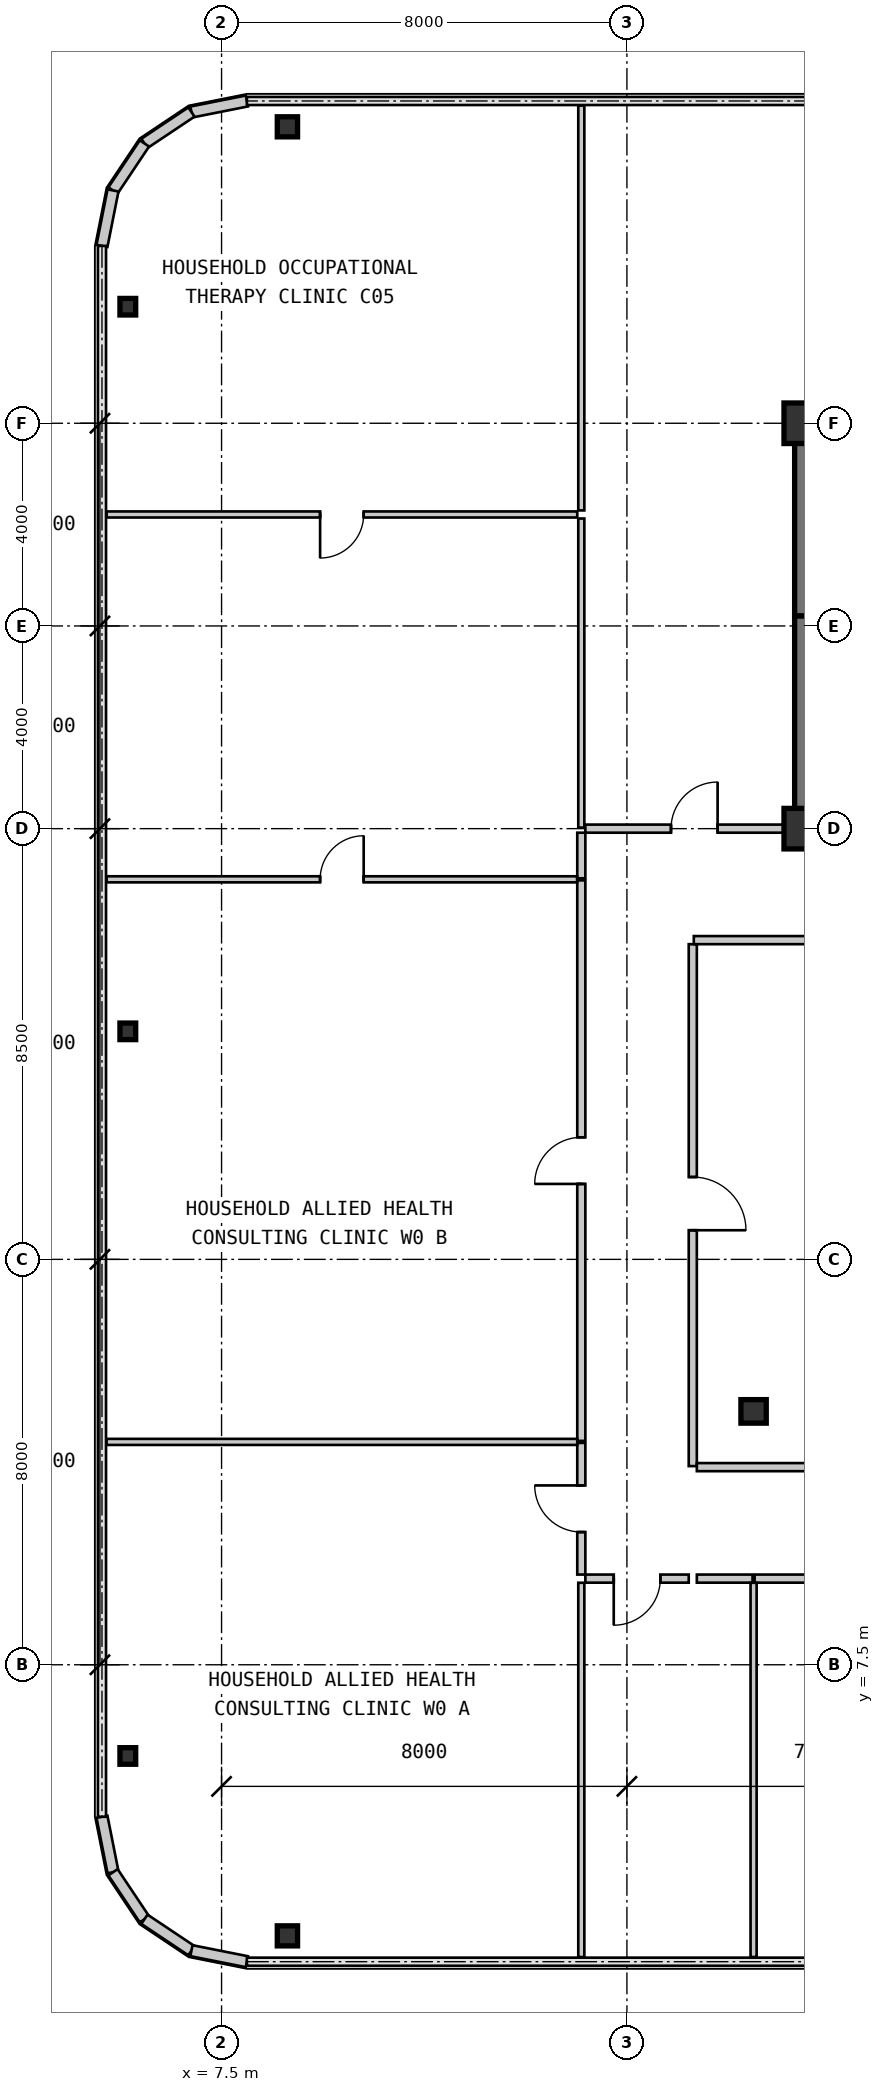
"""IFC4 building model, lengths in metres.
Left out: names, types, materials, properties, quantities, classifications, styles, units other than length and angle.
Written with IfcOpenShell. Run it as: python <this file> out.ifc"""

import sys

from ifc_helpers import new_model, si_unit, direction, frame, frame_2d, origin, origin_2d, place, context, subcontext, project, spatial, rectangle, i_section, extrude, source, transform, mapped, element, fill, save


model = new_model("IFC4")
c1 = context("Model", 3, precision=1e-05, world=origin(), true_north=direction((0.0, 1.0)))
c2 = subcontext(c1, "Body", "Model", "MODEL_VIEW")
j1 = project(units=[si_unit("LENGTHUNIT", "METRE"), si_unit("PLANEANGLEUNIT", "RADIAN")], contexts=[c1])
p1 = place(None, origin())
s1 = spatial("IfcSite", under=j1, at=p1, CompositionType="ELEMENT")
p2 = place(p1, origin())
s2 = spatial("IfcBuilding", under=s1, at=p2, CompositionType="ELEMENT")
p3 = place(p2, frame((0.0, 0.0, 57.75)))
s3 = spatial("IfcBuildingStorey", under=s2, at=p3, CompositionType="ELEMENT", Elevation=57.75)
m1 = source(origin(), c2, "Body", "SweptSolid", [
    extrude(rectangle(XDim=0.8, YDim=0.8, at=origin_2d()), origin(), (0.0, 0.0, 1.0), 3.15),
])
for number, where, z_axis, x_axis in (
    (1, (19.0, 24.0, 0.0), (0.0, 0.0, 1.0), (1.0, 0.0, 0.0)),
    (2, (19.0, 32.0, 0.0), (0.0, 0.0, 1.0), (1.0, 0.0, 0.0)),
):
    element("IfcColumn", number, at=place(p3, frame(where, z_axis=z_axis, x_axis=x_axis)), inside=s3, PredefinedType="COLUMN", context=c2, shape_type="MappedRepresentation", body=[
        mapped(m1, transform((0.0, 0.0, 0.0), scale=1.0)),
    ])
m2 = source(origin(), c2, "Body", "SweptSolid", [
    extrude(i_section(OverallWidth=0.5, OverallDepth=0.464, WebThickness=0.022, FlangeThickness=0.034, at=origin_2d()), origin(), (0.0, 0.0, 1.0), 3.15),
])
p4 = place(p3, frame((18.0, 12.5, 0.0), z_axis=(0.0, 0.0, 1.0), x_axis=(1.0, 0.0, 0.0)))
e3 = element("IfcColumn", 3, at=p4, inside=s3, PredefinedType="COLUMN", context=c2, shape_type="MappedRepresentation", body=[
    mapped(m2, transform((0.0, 0.0, 0.0), scale=1.0)),
])
m3 = source(origin(), c2, "Body", "SweptSolid", [
    extrude(i_section(OverallWidth=0.4, OverallDepth=0.396, WebThickness=0.022, FlangeThickness=0.034, at=origin_2d()), origin(), (0.0, 0.0, 1.0), 3.15),
])
for number, where, z_axis, x_axis in (
    (4, (8.8, 2.15, 0.0), (0.0, 0.0, 1.0), (1.0, 0.0, 0.0)),
    (5, (8.8, 37.85, 0.0), (0.0, 0.0, 1.0), (1.0, 0.0, 0.0)),
):
    element("IfcColumn", number, at=place(p3, frame(where, z_axis=z_axis, x_axis=x_axis)), inside=s3, PredefinedType="COLUMN", context=c2, shape_type="MappedRepresentation", body=[
        mapped(m3, transform((0.0, 0.0, 0.0), scale=1.0)),
    ])
m4 = source(origin(), c2, "Body", "SweptSolid", [
    extrude(i_section(OverallWidth=0.311, OverallDepth=0.327, WebThickness=0.016, FlangeThickness=0.025, at=origin_2d()), origin(), (0.0, 0.0, 1.0), 3.15),
])
for number, where, z_axis, x_axis in (
    (6, (5.65, 5.7, 0.0), (0.0, 0.0, 1.0), (1.0, 0.0, 0.0)),
    (7, (5.65, 20.0, 0.0), (0.0, 0.0, 1.0), (1.0, 0.0, 0.0)),
    (8, (5.65, 34.3, 0.0), (0.0, 0.0, 1.0), (1.0, 0.0, 0.0)),
):
    element("IfcColumn", number, at=place(p3, frame(where, z_axis=z_axis, x_axis=x_axis)), inside=s3, PredefinedType="COLUMN", context=c2, shape_type="MappedRepresentation", body=[
        mapped(m4, transform((0.0, 0.0, 0.0), scale=1.0)),
    ])
m5 = source(origin(), c2, "Body", "SweptSolid", [
    extrude(rectangle(XDim=1.116, YDim=0.22, at=frame_2d((0.558, 0.0))), origin(), (0.0, 0.0, 1.0), 2.87),
])
for number, where, z_axis, x_axis in (
    (9, (8.0, 38.36, 0.0), (0.0, 0.0, 1.0), (-0.981, -0.195, 0.0)),
    (10, (6.906, 38.142, 0.0), (0.0, 0.0, 1.0), (-0.831, -0.556, 0.0)),
    (11, (5.978, 37.522, 0.0), (0.0, 0.0, 1.0), (-0.556, -0.831, 0.0)),
    (12, (5.358, 36.594, 0.0), (0.0, 0.0, 1.0), (-0.195, -0.981, 0.0)),
    (13, (5.14, 4.5, 0.0), (0.0, 0.0, 1.0), (0.195, -0.981, 0.0)),
    (14, (5.358, 3.406, 0.0), (0.0, 0.0, 1.0), (0.556, -0.831, 0.0)),
    (15, (5.978, 2.478, 0.0), (0.0, 0.0, 1.0), (0.831, -0.556, 0.0)),
    (16, (6.906, 1.858, 0.0), (0.0, 0.0, 1.0), (0.981, -0.195, 0.0)),
):
    element("IfcWall", number, at=place(p3, frame(where, z_axis=z_axis, x_axis=x_axis)), inside=s3, PredefinedType="SOLIDWALL", context=c2, shape_type="MappedRepresentation", body=[
        mapped(m5, transform((0.0, 0.0, 0.0), scale=1.0)),
    ])
m6 = source(origin(), c2, "Body", "SweptSolid", [
    extrude(rectangle(XDim=9.19, YDim=0.38, at=frame_2d((4.595, 0.0))), origin(), (0.0, 0.0, 1.0), 2.87),
])
p5 = place(p3, frame((18.81, 32.0, 0.0), z_axis=(0.0, 0.0, 1.0), x_axis=(1.0, 0.0, 0.0)))
e17 = element("IfcWall", 17, at=p5, inside=s3, PredefinedType="SHEAR", context=c2, shape_type="MappedRepresentation", body=[
    mapped(m6, transform((0.0, 0.0, 0.0), scale=1.0)),
])
m7 = source(origin(), c2, "Body", "SweptSolid", [
    extrude(rectangle(XDim=4.01, YDim=0.38, at=frame_2d((2.005, 0.0))), origin(), (0.0, 0.0, 1.0), 2.87),
])
p6 = place(p3, frame((19.0, 24.19, 0.0), z_axis=(0.0, 0.0, 1.0), x_axis=(0.0, 1.0, 0.0)))
e18 = element("IfcWall", 18, at=p6, inside=s3, PredefinedType="SHEAR", context=c2, shape_type="MappedRepresentation", body=[
    mapped(m7, transform((0.0, 0.0, 0.0), scale=1.0)),
])
m8 = source(origin(), c2, "Body", "SweptSolid", [
    extrude(rectangle(XDim=3.61, YDim=0.38, at=frame_2d((1.805, 0.0))), origin(), (0.0, 0.0, 1.0), 2.87),
])
p7 = place(p3, frame((19.0, 28.2, 0.0), z_axis=(0.0, 0.0, 1.0), x_axis=(0.0, 1.0, 0.0)))
e19 = element("IfcWall", 19, at=p7, inside=s3, PredefinedType="SHEAR", context=c2, shape_type="MappedRepresentation", body=[
    mapped(m8, transform((0.0, 0.0, 0.0), scale=1.0)),
])
m9 = source(origin(), c2, "Body", "SweptSolid", [
    extrude(rectangle(XDim=4.98, YDim=0.38, at=frame_2d((2.49, 0.0))), origin(), (0.0, 0.0, 1.0), 2.87),
])
p8 = place(p3, frame((18.81, 24.0, 0.0), z_axis=(0.0, 0.0, 1.0), x_axis=(1.0, 0.0, 0.0)))
e20 = element("IfcWall", 20, at=p8, inside=s3, PredefinedType="SHEAR", context=c2, shape_type="MappedRepresentation", body=[
    mapped(m9, transform((0.0, 0.0, 0.0), scale=1.0)),
])
m10 = source(origin(), c2, "Body", "SweptSolid", [
    extrude(rectangle(XDim=10.3, YDim=0.16, at=frame_2d((5.15, 0.0))), origin(), (0.0, 0.0, 1.0), 2.87),
])
p9 = place(p3, frame((16.8, 21.72, 0.0), z_axis=(0.0, 0.0, 1.0), x_axis=(0.0, -1.0, 0.0)))
e21 = element("IfcWall", 21, at=p9, inside=s3, PredefinedType="PARTITIONING", context=c2, shape_type="MappedRepresentation", body=[
    mapped(m10, transform((0.0, 0.0, 0.0), scale=1.0)),
])
m11 = source(origin(), c2, "Body", "SweptSolid", [
    extrude(rectangle(XDim=1.05, YDim=2.1, at=frame_2d((0.525, 1.05))), frame((0.0, 0.09, 0.0), z_axis=(0.0, -1.0, 0.0), x_axis=(1.0, 0.0, 0.0)), (0.0, 0.0, 1.0), 0.18),
])
p10 = place(p9, frame((4.595, 0.0, 0.0)))
e22 = element("IfcOpeningElement", 22, at=p10, cuts=e21, PredefinedType="OPENING", context=c2, shape_type="MappedRepresentation", body=[
    mapped(m11, transform((0.0, 0.0, 0.0), scale=1.0)),
])
m12 = source(origin(), c2, "Body", "SweptSolid", [
    extrude(rectangle(XDim=9.159, YDim=0.16, at=frame_2d((4.58, 0.0))), origin(), (0.0, 0.0, 1.0), 2.87),
])
p11 = place(p3, frame((25.98, 21.8, 0.0), z_axis=(0.0, 0.0, 1.0), x_axis=(-1.0, 0.0, 0.0)))
e23 = element("IfcWall", 23, at=p11, inside=s3, PredefinedType="PARTITIONING", context=c2, shape_type="MappedRepresentation", body=[
    mapped(m12, transform((0.0, 0.0, 0.0), scale=1.0)),
])
m13 = source(origin(), c2, "Body", "SweptSolid", [
    extrude(rectangle(XDim=2.04, YDim=0.16, at=frame_2d((1.02, 0.0))), origin(), (0.0, 0.0, 1.0), 2.87),
])
p12 = place(p3, frame((16.72, 9.2, 0.0), z_axis=(0.0, 0.0, 1.0), x_axis=(-1.0, 0.0, 0.0)))
e24 = element("IfcWall", 24, at=p12, inside=s3, PredefinedType="PARTITIONING", context=c2, shape_type="MappedRepresentation", body=[
    mapped(m13, transform((0.0, 0.0, 0.0), scale=1.0)),
])
m14 = source(origin(), c2, "Body", "SweptSolid", [
    extrude(rectangle(XDim=0.92, YDim=2.1, at=frame_2d((0.46, 1.05))), frame((0.0, 0.09, 0.0), z_axis=(0.0, -1.0, 0.0), x_axis=(1.0, 0.0, 0.0)), (0.0, 0.0, 1.0), 0.18),
])
p13 = place(p12, frame((0.56, 0.0, 0.0)))
e25 = element("IfcOpeningElement", 25, at=p13, cuts=e24, PredefinedType="OPENING", context=c2, shape_type="MappedRepresentation", body=[
    mapped(m14, transform((0.0, 0.0, 0.0), scale=1.0)),
])
m15 = source(origin(), c2, "Body", "SweptSolid", [
    extrude(rectangle(XDim=2.598, YDim=0.16, at=frame_2d((1.299, 0.0))), origin(), (0.0, 0.0, 1.0), 2.87),
])
p14 = place(p3, frame((14.6, 9.28, 0.0), z_axis=(0.0, 0.0, 1.0), x_axis=(0.0, 1.0, 0.0)))
e26 = element("IfcWall", 26, at=p14, inside=s3, PredefinedType="PARTITIONING", context=c2, shape_type="MappedRepresentation", body=[
    mapped(m15, transform((0.0, 0.0, 0.0), scale=1.0)),
])
p15 = place(p14, frame((0.839, 0.0, 0.0)))
e27 = element("IfcOpeningElement", 27, at=p15, cuts=e26, PredefinedType="OPENING", context=c2, shape_type="MappedRepresentation", body=[
    mapped(m14, transform((0.0, 0.0, 0.0), scale=1.0)),
])
m16 = source(origin(), c2, "Body", "SweptSolid", [
    extrude(rectangle(XDim=11.061, YDim=0.16, at=frame_2d((5.531, 0.0))), origin(), (0.0, 0.0, 1.0), 2.87),
])
p16 = place(p3, frame((14.6, 11.918, 0.0), z_axis=(0.0, 0.0, 1.0), x_axis=(0.0, 1.0, 0.0)))
e28 = element("IfcWall", 28, at=p16, inside=s3, PredefinedType="PARTITIONING", context=c2, shape_type="MappedRepresentation", body=[
    mapped(m16, transform((0.0, 0.0, 0.0), scale=1.0)),
])
p17 = place(p16, frame((5.071, 0.0, 0.0)))
e29 = element("IfcOpeningElement", 29, at=p17, cuts=e28, PredefinedType="OPENING", context=c2, shape_type="MappedRepresentation", body=[
    mapped(m14, transform((0.0, 0.0, 0.0), scale=1.0)),
])
m17 = source(origin(), c2, "Body", "SweptSolid", [
    extrude(rectangle(XDim=0.9, YDim=0.16, at=frame_2d((0.45, 0.0))), origin(), (0.0, 0.0, 1.0), 2.87),
])
p18 = place(p3, frame((14.6, 23.02, 0.0), z_axis=(0.0, 0.0, 1.0), x_axis=(0.0, 1.0, 0.0)))
e30 = element("IfcWall", 30, at=p18, inside=s3, PredefinedType="PARTITIONING", context=c2, shape_type="MappedRepresentation", body=[
    mapped(m17, transform((0.0, 0.0, 0.0), scale=1.0)),
])
m18 = source(origin(), c2, "Body", "SweptSolid", [
    extrude(rectangle(XDim=4.13, YDim=0.16, at=frame_2d((2.065, 0.0))), origin(), (0.0, 0.0, 1.0), 2.87),
])
p19 = place(p3, frame((14.68, 24.0, 0.0), z_axis=(0.0, 0.0, 1.0), x_axis=(1.0, 0.0, 0.0)))
e31 = element("IfcWall", 31, at=p19, inside=s3, PredefinedType="PARTITIONING", context=c2, shape_type="MappedRepresentation", body=[
    mapped(m18, transform((0.0, 0.0, 0.0), scale=1.0)),
])
p20 = place(p19, frame((1.69, 0.0, 0.0)))
e32 = element("IfcOpeningElement", 32, at=p20, cuts=e31, PredefinedType="OPENING", context=c2, shape_type="MappedRepresentation", body=[
    mapped(m14, transform((0.0, 0.0, 0.0), scale=1.0)),
])
m19 = source(origin(), c2, "Body", "SweptSolid", [
    extrude(rectangle(XDim=9.1, YDim=0.16, at=frame_2d((4.55, 0.0))), origin(), (0.0, 0.0, 1.0), 2.87),
])
p21 = place(p3, frame((16.88, 11.4, 0.0), z_axis=(0.0, 0.0, 1.0), x_axis=(1.0, 0.0, 0.0)))
e33 = element("IfcWall", 33, at=p21, inside=s3, PredefinedType="PARTITIONING", context=c2, shape_type="MappedRepresentation", body=[
    mapped(m19, transform((0.0, 0.0, 0.0), scale=1.0)),
])
m20 = source(origin(), c2, "Body", "SweptSolid", [
    extrude(rectangle(XDim=1.1, YDim=0.16, at=frame_2d((0.55, 0.0))), origin(), (0.0, 0.0, 1.0), 2.87),
])
p22 = place(p3, frame((17.98, 9.2, 0.0), z_axis=(0.0, 0.0, 1.0), x_axis=(-1.0, 0.0, 0.0)))
e34 = element("IfcWall", 34, at=p22, inside=s3, PredefinedType="PARTITIONING", context=c2, shape_type="MappedRepresentation", body=[
    mapped(m20, transform((0.0, 0.0, 0.0), scale=1.0)),
])
m21 = source(origin(), c2, "Body", "SweptSolid", [
    extrude(rectangle(XDim=9.959, YDim=0.16, at=frame_2d((4.98, 0.0))), origin(), (0.0, 0.0, 1.0), 2.87),
])
p23 = place(p3, frame((27.98, 9.2, 0.0), z_axis=(0.0, 0.0, 1.0), x_axis=(-1.0, 0.0, 0.0)))
e35 = element("IfcWall", 35, at=p23, inside=s3, PredefinedType="PARTITIONING", context=c2, shape_type="MappedRepresentation", body=[
    mapped(m21, transform((0.0, 0.0, 0.0), scale=1.0)),
])
p24 = place(p23, frame((4.52, 0.0, 0.0)))
e36 = element("IfcOpeningElement", 36, at=p24, cuts=e35, PredefinedType="OPENING", context=c2, shape_type="MappedRepresentation", body=[
    mapped(m14, transform((0.0, 0.0, 0.0), scale=1.0)),
])
m22 = source(origin(), c2, "Body", "SweptSolid", [
    extrude(rectangle(XDim=7.386, YDim=0.12, at=frame_2d((3.693, 0.0))), origin(), (0.0, 0.0, 1.0), 2.87),
])
for number, where, z_axis, x_axis in (
    (37, (18.0, 9.118, 0.0), (0.0, 0.0, 1.0), (0.0, -1.0, 0.0)),
    (38, (14.6, 1.732, 0.0), (0.0, 0.0, 1.0), (0.0, 1.0, 0.0)),
):
    element("IfcWall", number, at=place(p3, frame(where, z_axis=z_axis, x_axis=x_axis)), inside=s3, PredefinedType="PARTITIONING", context=c2, shape_type="MappedRepresentation", body=[
        mapped(m22, transform((0.0, 0.0, 0.0), scale=1.0)),
    ])
m23 = source(origin(), c2, "Body", "SweptSolid", [
    extrude(rectangle(XDim=9.29, YDim=0.12, at=frame_2d((4.645, 0.0))), origin(), (0.0, 0.0, 1.0), 2.87),
])
p25 = place(p3, frame((5.23, 11.898, 0.0), z_axis=(0.0, 0.0, 1.0), x_axis=(1.0, 0.0, 0.0)))
e39 = element("IfcWall", 39, at=p25, inside=s3, PredefinedType="PARTITIONING", context=c2, shape_type="MappedRepresentation", body=[
    mapped(m23, transform((0.0, 0.0, 0.0), scale=1.0)),
])
m24 = source(origin(), c2, "Body", "SweptSolid", [
    extrude(rectangle(XDim=9.284, YDim=0.12, at=frame_2d((4.642, 0.0))), origin(), (0.0, 0.0, 1.0), 2.87),
])
p26 = place(p3, frame((5.233, 23.0, 0.0), z_axis=(0.0, 0.0, 1.0), x_axis=(1.0, 0.0, 0.0)))
e40 = element("IfcWall", 40, at=p26, inside=s3, PredefinedType="PARTITIONING", context=c2, shape_type="MappedRepresentation", body=[
    mapped(m24, transform((0.0, 0.0, 0.0), scale=1.0)),
])
m25 = source(origin(), c2, "Body", "SweptSolid", [
    extrude(rectangle(XDim=0.86, YDim=2.1, at=frame_2d((0.43, 1.05))), frame((0.0, 0.07, 0.0), z_axis=(0.0, -1.0, 0.0), x_axis=(1.0, 0.0, 0.0)), (0.0, 0.0, 1.0), 0.14),
])
p27 = place(p26, frame((4.212, 0.0, 0.0)))
e41 = element("IfcOpeningElement", 41, at=p27, cuts=e40, PredefinedType="OPENING", context=c2, shape_type="MappedRepresentation", body=[
    mapped(m25, transform((0.0, 0.0, 0.0), scale=1.0)),
])
p28 = place(p3, frame((5.23, 30.2, 0.0), z_axis=(0.0, 0.0, 1.0), x_axis=(1.0, 0.0, 0.0)))
e42 = element("IfcWall", 42, at=p28, inside=s3, PredefinedType="PARTITIONING", context=c2, shape_type="MappedRepresentation", body=[
    mapped(m23, transform((0.0, 0.0, 0.0), scale=1.0)),
])
p29 = place(p28, frame((4.215, 0.0, 0.0)))
e43 = element("IfcOpeningElement", 43, at=p29, cuts=e42, PredefinedType="OPENING", context=c2, shape_type="MappedRepresentation", body=[
    mapped(m25, transform((0.0, 0.0, 0.0), scale=1.0)),
])
m26 = source(origin(), c2, "Body", "SweptSolid", [
    extrude(rectangle(XDim=6.1, YDim=0.12, at=frame_2d((3.05, 0.0))), origin(), (0.0, 0.0, 1.0), 2.87),
])
p30 = place(p3, frame((14.6, 30.12, 0.0), z_axis=(0.0, 0.0, 1.0), x_axis=(0.0, -1.0, 0.0)))
e44 = element("IfcWall", 44, at=p30, inside=s3, PredefinedType="PARTITIONING", context=c2, shape_type="MappedRepresentation", body=[
    mapped(m26, transform((0.0, 0.0, 0.0), scale=1.0)),
])
m27 = source(origin(), c2, "Body", "SweptSolid", [
    extrude(rectangle(XDim=7.99, YDim=0.12, at=frame_2d((3.995, 0.0))), origin(), (0.0, 0.0, 1.0), 2.87),
])
p31 = place(p3, frame((14.6, 38.27, 0.0), z_axis=(0.0, 0.0, 1.0), x_axis=(0.0, -1.0, 0.0)))
e45 = element("IfcWall", 45, at=p31, inside=s3, PredefinedType="PARTITIONING", context=c2, shape_type="MappedRepresentation", body=[
    mapped(m27, transform((0.0, 0.0, 0.0), scale=1.0)),
])
m28 = source(origin(), c2, "Body", "SweptSolid", [
    extrude(rectangle(XDim=1.05, YDim=2.1, at=frame_2d((0.525, 1.05))), frame((0.0, 0.025, 0.0), z_axis=(0.0, -1.0, 0.0), x_axis=(1.0, 0.0, 0.0)), (0.0, 0.0, 1.0), 0.05),
])
p32 = place(p10, origin())
e46 = element("IfcDoor", 46, at=p32, inside=s3, OperationType="SINGLE_SWING_RIGHT", PredefinedType="DOOR", context=c2, shape_type="MappedRepresentation", body=[
    mapped(m28, transform((0.0, 0.0, 0.0), scale=1.0)),
])
fill(e22, e46)
m29 = source(origin(), c2, "Body", "SweptSolid", [
    extrude(rectangle(XDim=0.92, YDim=2.1, at=frame_2d((0.46, 1.05))), frame((0.0, 0.025, 0.0), z_axis=(0.0, -1.0, 0.0), x_axis=(1.0, 0.0, 0.0)), (0.0, 0.0, 1.0), 0.05),
])
p33 = place(p13, origin())
e47 = element("IfcDoor", 47, at=p33, inside=s3, OperationType="SINGLE_SWING_RIGHT", PredefinedType="DOOR", context=c2, shape_type="MappedRepresentation", body=[
    mapped(m29, transform((0.0, 0.0, 0.0), scale=1.0)),
])
fill(e25, e47)
p34 = place(p15, origin())
e48 = element("IfcDoor", 48, at=p34, inside=s3, OperationType="SINGLE_SWING_RIGHT", PredefinedType="DOOR", context=c2, shape_type="MappedRepresentation", body=[
    mapped(m29, transform((0.0, 0.0, 0.0), scale=1.0)),
])
fill(e27, e48)
p35 = place(p17, origin())
e49 = element("IfcDoor", 49, at=p35, inside=s3, OperationType="SINGLE_SWING_LEFT", PredefinedType="DOOR", context=c2, shape_type="MappedRepresentation", body=[
    mapped(m29, transform((0.0, 0.0, 0.0), scale=1.0)),
])
fill(e29, e49)
p36 = place(p20, origin())
e50 = element("IfcDoor", 50, at=p36, inside=s3, OperationType="SINGLE_SWING_RIGHT", PredefinedType="DOOR", context=c2, shape_type="MappedRepresentation", body=[
    mapped(m29, transform((0.0, 0.0, 0.0), scale=1.0)),
])
fill(e32, e50)
m30 = source(origin(), c2, "Body", "SweptSolid", [
    extrude(rectangle(XDim=0.86, YDim=2.1, at=frame_2d((0.43, 1.05))), frame((0.0, 0.025, 0.0), z_axis=(0.0, -1.0, 0.0), x_axis=(1.0, 0.0, 0.0)), (0.0, 0.0, 1.0), 0.05),
])
p37 = place(p27, origin())
e51 = element("IfcDoor", 51, at=p37, inside=s3, OperationType="SINGLE_SWING_RIGHT", PredefinedType="DOOR", context=c2, shape_type="MappedRepresentation", body=[
    mapped(m30, transform((0.0, 0.0, 0.0), scale=1.0)),
])
fill(e41, e51)
p38 = place(p29, frame((0.86, 0.0, 0.0), z_axis=(0.0, 0.0, 1.0), x_axis=(-1.0, 0.0, 0.0)))
e52 = element("IfcDoor", 52, at=p38, inside=s3, OperationType="SINGLE_SWING_RIGHT", PredefinedType="DOOR", context=c2, shape_type="MappedRepresentation", body=[
    mapped(m30, transform((0.0, 0.0, 0.0), scale=1.0)),
])
fill(e43, e52)
save(model, sys.argv[1])
